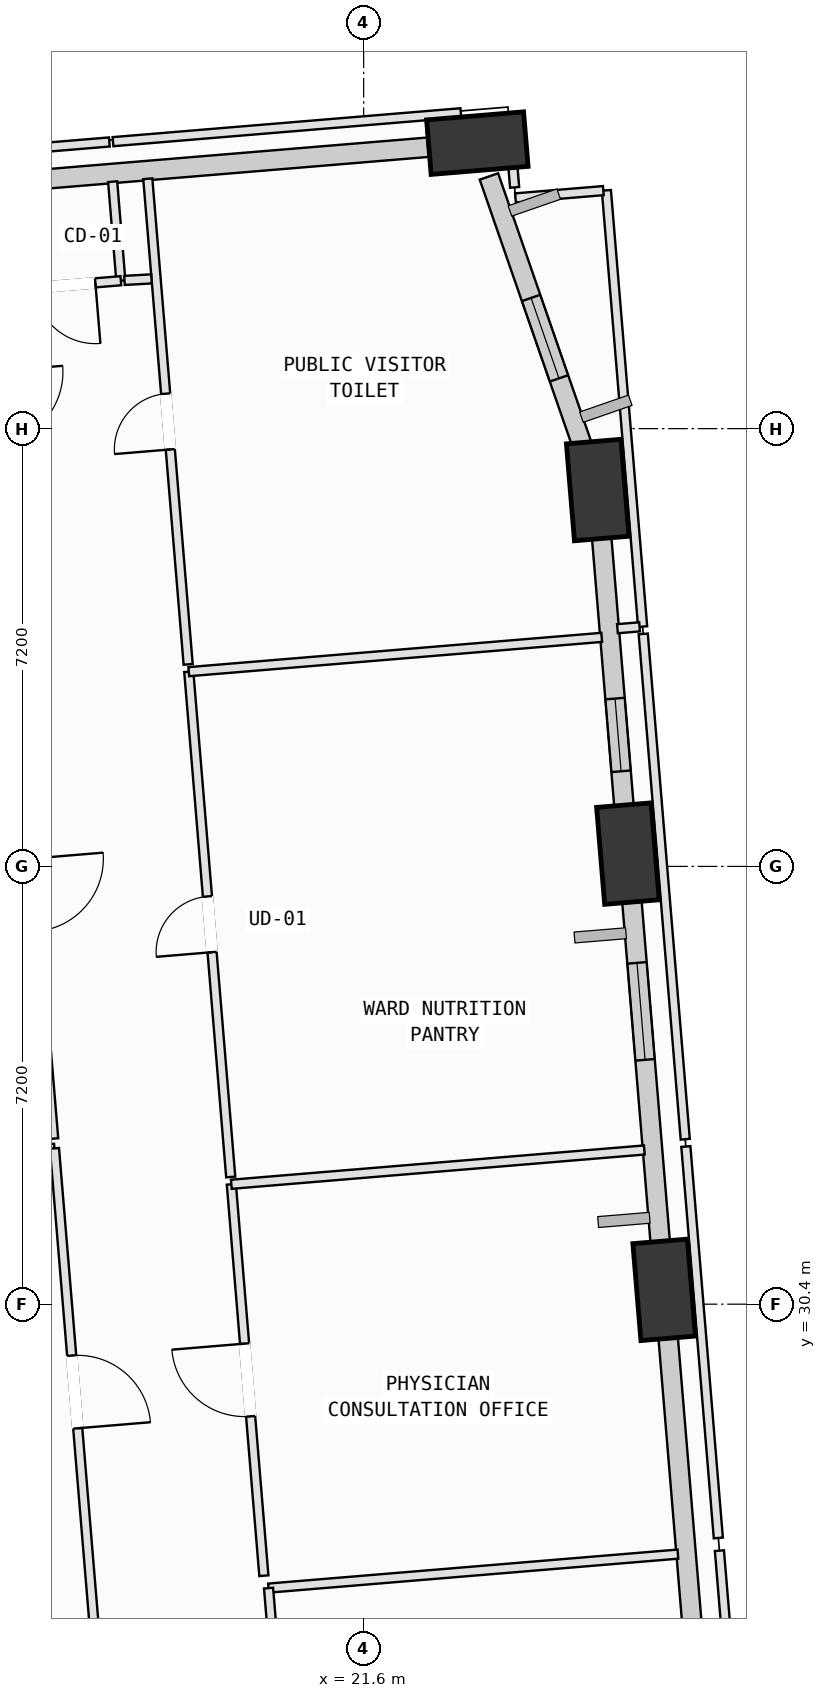
"""IFC4 building model, lengths in metres.
Left out: names, types, materials, properties, quantities, classifications, styles, units other than length and angle.
Written with IfcOpenShell. Run it as: python <this file> out.ifc"""

import sys

from ifc_helpers import new_model, si_unit, direction, frame, frame_2d, origin, origin_2d, place, context, subcontext, project, spatial, rectangle, extrude, element, fill, save


model = new_model("IFC4")
c1 = context("Model", 3, precision=1e-05, world=origin(), true_north=direction((0.0, 1.0)))
c2 = subcontext(c1, "Body", "Model", "MODEL_VIEW")
j1 = project(units=[si_unit("LENGTHUNIT", "METRE"), si_unit("PLANEANGLEUNIT", "RADIAN")], contexts=[c1])
p1 = place(None, origin())
s1 = spatial("IfcSite", under=j1, at=p1, CompositionType="ELEMENT")
p2 = place(p1, origin())
s2 = spatial("IfcBuilding", under=s1, at=p2, CompositionType="ELEMENT")
p3 = place(p2, frame((0.0, 0.0, 43.0)))
s3 = spatial("IfcBuildingStorey", under=s2, at=p3, CompositionType="ELEMENT", Elevation=43.0)
p4 = place(p3, frame((26.542, 30.635, 0.002), z_axis=(-0.023929015916, -0.029422922632, 0.999280588134), x_axis=(0.564092616343, 0.824846092772, 0.03779475396)))
e1 = element("IfcColumn", 1, at=p4, inside=s3, PredefinedType="COLUMN", context=c2, shape_type="SweptSolid", body=[
    extrude(rectangle(XDim=1.6, YDim=0.9, at=origin_2d()), origin(), (0.0, 0.0, 1.0), 4.0),
])
p5 = place(p3, frame((25.946, 37.811, 0.002), z_axis=(-0.053590964429, -0.03206922331, 0.99804788134), x_axis=(0.810957592379, 0.581785272083, 0.062238899011)))
e2 = element("IfcColumn", 2, at=p5, inside=s3, PredefinedType="COLUMN", context=c2, shape_type="SweptSolid", body=[
    extrude(rectangle(XDim=1.6, YDim=0.9, at=origin_2d()), origin(), (0.0, 0.0, 1.0), 4.004),
])
p6 = place(p3, frame((25.449, 43.79, 0.002), z_axis=(-0.078149906761, -0.034327529138, 0.996350446789), x_axis=(0.875790181589, 0.47513759138, 0.085063664917)))
e3 = element("IfcColumn", 3, at=p6, inside=s3, PredefinedType="COLUMN", context=c2, shape_type="SweptSolid", body=[
    extrude(rectangle(XDim=1.6, YDim=0.9, at=origin_2d()), origin(), (0.0, 0.0, 1.0), 4.011),
])
p7 = place(p3, frame((23.47, 49.496, 0.002), z_axis=(-0.10139716979, -0.042562524565, 0.993935131415), x_axis=(0.461606570923, -0.887038020539, 0.009106250522)))
e4 = element("IfcColumn", 4, at=p7, inside=s3, PredefinedType="COLUMN", context=c2, shape_type="SweptSolid", body=[
    extrude(rectangle(XDim=1.6, YDim=0.9, at=origin_2d()), origin(), (0.0, 0.0, 1.0), 4.021),
])
p8 = place(p3, frame((27.138, 23.464, 0.0), z_axis=(0.0, 0.0, 1.0), x_axis=(-0.082810543058, 0.996565308426, 0.0)))
e5 = element("IfcWall", 5, at=p8, inside=s3, PredefinedType="SOLIDWALL", context=c2, shape_type="SweptSolid", body=[
    extrude(rectangle(XDim=6.536, YDim=0.32, at=frame_2d((3.268, 0.0))), origin(), (0.0, 0.0, 1.0), 3.165),
])
p9 = place(p3, frame((26.497, 31.185, 0.0), z_axis=(0.0, 0.0, 1.0), x_axis=(-0.082812984625, 0.996565105539, 0.0)))
e6 = element("IfcWall", 6, at=p9, inside=s3, PredefinedType="SOLIDWALL", context=c2, shape_type="SweptSolid", body=[
    extrude(rectangle(XDim=5.996, YDim=0.32, at=frame_2d((2.998, 0.0))), origin(), (0.0, 0.0, 1.0), 3.165),
])
p10 = place(p9, frame((3.246, 0.0, 0.75)))
e7 = element("IfcOpeningElement", 7, at=p10, cuts=e6, PredefinedType="OPENING", context=c2, shape_type="SweptSolid", body=[
    extrude(rectangle(XDim=1.6, YDim=1.95, at=frame_2d((0.8, 0.975))), frame((0.0, 0.17, 0.0), z_axis=(0.0, -1.0, 0.0), x_axis=(1.0, 0.0, 0.0)), (0.0, 0.0, 1.0), 0.34),
])
p11 = place(p3, frame((25.901, 38.351, 0.0), z_axis=(0.0, 0.0, 1.0), x_axis=(-0.082781175694, 0.996567748299, 0.0)))
e8 = element("IfcWall", 8, at=p11, inside=s3, PredefinedType="SOLIDWALL", context=c2, shape_type="SweptSolid", body=[
    extrude(rectangle(XDim=4.816, YDim=0.32, at=frame_2d((2.408, 0.0))), origin(), (0.0, 0.0, 1.0), 3.165),
])
p12 = place(p11, frame((0.816, 0.0, 0.75)))
e9 = element("IfcOpeningElement", 9, at=p12, cuts=e8, PredefinedType="OPENING", context=c2, shape_type="SweptSolid", body=[
    extrude(rectangle(XDim=1.2, YDim=1.75, at=frame_2d((0.6, 0.875))), frame((0.0, 0.17, 0.0), z_axis=(0.0, -1.0, 0.0), x_axis=(1.0, 0.0, 0.0)), (0.0, 0.0, 1.0), 0.34),
])
p13 = place(p3, frame((23.66, 48.948, 0.0), z_axis=(0.0, 0.0, 1.0), x_axis=(0.327739954764, -0.9447679726, 0.0)))
e10 = element("IfcWall", 10, at=p13, inside=s3, PredefinedType="SOLIDWALL", context=c2, shape_type="SweptSolid", body=[
    extrude(rectangle(XDim=4.889, YDim=0.32, at=frame_2d((2.444, 0.0))), origin(), (0.0, 0.0, 1.0), 3.165),
])
p14 = place(p13, frame((2.115, 0.0, 0.75)))
e11 = element("IfcOpeningElement", 11, at=p14, cuts=e10, PredefinedType="OPENING", context=c2, shape_type="SweptSolid", body=[
    extrude(rectangle(XDim=1.4, YDim=1.85, at=frame_2d((0.7, 0.925))), frame((0.0, 0.17, 0.0), z_axis=(0.0, -1.0, 0.0), x_axis=(1.0, 0.0, 0.0)), (0.0, 0.0, 1.0), 0.34),
])
p15 = place(p3, frame((15.679, 48.849, 0.0), z_axis=(0.0, 0.0, 1.0), x_axis=(0.996566404155, 0.082797355694, 0.0)))
e12 = element("IfcWall", 12, at=p15, inside=s3, PredefinedType="SOLIDWALL", context=c2, shape_type="SweptSolid", body=[
    extrude(rectangle(XDim=7.003, YDim=0.32, at=frame_2d((3.501, 0.0))), origin(), (0.0, 0.0, 1.0), 3.165),
])
p16 = place(p3, frame((5.588, 32.055, 0.0), z_axis=(0.0, 0.0, 1.0), x_axis=(0.996565539079, 0.082807767273, 0.0)))
e13 = element("IfcWall", 13, at=p16, inside=s3, PredefinedType="PARTITIONING", context=c2, shape_type="SweptSolid", body=[
    extrude(rectangle(XDim=10.965, YDim=0.15, at=frame_2d((5.482, 0.0))), origin(), (0.0, 0.0, 1.0), 3.365),
])
p17 = place(p3, frame((16.515, 32.963, 0.0), z_axis=(0.0, 0.0, 1.0), x_axis=(0.082841912697, -0.996562701239, 0.0)))
e14 = element("IfcWall", 14, at=p17, inside=s3, PredefinedType="PARTITIONING", context=c2, shape_type="SweptSolid", body=[
    extrude(rectangle(XDim=8.04, YDim=0.15, at=frame_2d((4.02, 0.0))), origin(), (0.0, 0.0, 1.0), 3.78),
])
p18 = place(p17, frame((3.42, 0.0, 0.0)))
e15 = element("IfcOpeningElement", 15, at=p18, cuts=e14, PredefinedType="OPENING", context=c2, shape_type="SweptSolid", body=[
    extrude(rectangle(XDim=1.2, YDim=2.15, at=frame_2d((0.6, 1.075))), frame((0.0, 0.085, 0.0), z_axis=(0.0, -1.0, 0.0), x_axis=(1.0, 0.0, 0.0)), (0.0, 0.0, 1.0), 0.17),
])
p19 = place(p3, frame((15.836, 41.135, 0.0), z_axis=(0.0, 0.0, 1.0), x_axis=(0.082841912697, -0.996562701239, 0.0)))
e16 = element("IfcWall", 16, at=p19, inside=s3, PredefinedType="PARTITIONING", context=c2, shape_type="SweptSolid", body=[
    extrude(rectangle(XDim=8.04, YDim=0.15, at=frame_2d((4.02, 0.0))), origin(), (0.0, 0.0, 1.0), 3.78),
])
p20 = place(p19, frame((3.42, 0.0, 0.0)))
e17 = element("IfcOpeningElement", 17, at=p20, cuts=e16, PredefinedType="OPENING", context=c2, shape_type="SweptSolid", body=[
    extrude(rectangle(XDim=1.2, YDim=2.15, at=frame_2d((0.6, 1.075))), frame((0.0, 0.085, 0.0), z_axis=(0.0, -1.0, 0.0), x_axis=(1.0, 0.0, 0.0)), (0.0, 0.0, 1.0), 0.17),
])
p21 = place(p3, frame((20.036, 25.73, 0.0), z_axis=(0.0, 0.0, 1.0), x_axis=(0.99656939588, 0.082761338769, 0.0)))
e18 = element("IfcWall", 18, at=p21, inside=s3, PredefinedType="PARTITIONING", context=c2, shape_type="SweptSolid", body=[
    extrude(rectangle(XDim=6.755, YDim=0.15, at=frame_2d((3.378, 0.0))), origin(), (0.0, 0.0, 1.0), 3.78),
])
p22 = place(p3, frame((27.451, 26.346, 0.0), z_axis=(0.0, 0.0, 1.0), x_axis=(0.082846950407, -0.996562282453, 0.0)))
e19 = element("IfcWall", 19, at=p22, inside=s3, PredefinedType="PARTITIONING", context=c2, shape_type="SweptSolid", body=[
    extrude(rectangle(XDim=2.85, YDim=0.15, at=frame_2d((1.425, 0.0))), origin(), (0.0, 0.0, 1.0), 3.78),
])
p23 = place(p3, frame((20.464, 20.58, 0.0), z_axis=(0.0, 0.0, 1.0), x_axis=(-0.08286562624, 0.996560729704, 0.0)))
e20 = element("IfcWall", 20, at=p23, inside=s3, PredefinedType="PARTITIONING", context=c2, shape_type="SweptSolid", body=[
    extrude(rectangle(XDim=5.168, YDim=0.15, at=frame_2d((2.584, 0.0))), origin(), (0.0, 0.0, 1.0), 3.78),
])
p24 = place(p3, frame((19.959, 25.934, 0.0), z_axis=(0.0, 0.0, 1.0), x_axis=(-0.082801525688, 0.996566057692, 0.0)))
e21 = element("IfcWall", 21, at=p24, inside=s3, PredefinedType="PARTITIONING", context=c2, shape_type="SweptSolid", body=[
    extrude(rectangle(XDim=6.46, YDim=0.15, at=frame_2d((3.23, 0.0))), origin(), (0.0, 0.0, 1.0), 3.78),
])
p25 = place(p24, frame((2.63, 0.0, 0.0)))
e22 = element("IfcOpeningElement", 22, at=p25, cuts=e21, PredefinedType="OPENING", context=c2, shape_type="SweptSolid", body=[
    extrude(rectangle(XDim=1.2, YDim=2.15, at=frame_2d((0.6, 1.075))), frame((0.0, 0.085, 0.0), z_axis=(0.0, -1.0, 0.0), x_axis=(1.0, 0.0, 0.0)), (0.0, 0.0, 1.0), 0.17),
])
p26 = place(p3, frame((19.424, 32.372, 0.0), z_axis=(0.0, 0.0, 1.0), x_axis=(0.996570419035, 0.08274901754, 0.0)))
e23 = element("IfcWall", 23, at=p26, inside=s3, PredefinedType="PARTITIONING", context=c2, shape_type="SweptSolid", body=[
    extrude(rectangle(XDim=6.815, YDim=0.15, at=frame_2d((3.408, 0.0))), origin(), (0.0, 0.0, 1.0), 3.365),
])
p27 = place(p3, frame((26.899, 32.993, 0.0), z_axis=(0.0, 0.0, 1.0), x_axis=(0.082688926435, -0.996575406803, 0.0)))
e24 = element("IfcWall", 24, at=p27, inside=s3, PredefinedType="PARTITIONING", context=c2, shape_type="SweptSolid", body=[
    extrude(rectangle(XDim=6.46, YDim=0.15, at=frame_2d((3.23, 0.0))), origin(), (0.0, 0.0, 1.0), 3.78),
])
p28 = place(p3, frame((19.414, 32.492, 0.0), z_axis=(0.0, 0.0, 1.0), x_axis=(-0.082730519486, 0.996571954826, 0.0)))
e25 = element("IfcWall", 25, at=p28, inside=s3, PredefinedType="PARTITIONING", context=c2, shape_type="SweptSolid", body=[
    extrude(rectangle(XDim=8.34, YDim=0.15, at=frame_2d((4.17, 0.0))), origin(), (0.0, 0.0, 1.0), 3.78),
])
p29 = place(p28, frame((3.71, 0.0, 0.0)))
e26 = element("IfcOpeningElement", 26, at=p29, cuts=e25, PredefinedType="OPENING", context=c2, shape_type="SweptSolid", body=[
    extrude(rectangle(XDim=0.92, YDim=2.1, at=frame_2d((0.46, 1.05))), frame((0.0, 0.085, 0.0), z_axis=(0.0, -1.0, 0.0), x_axis=(1.0, 0.0, 0.0)), (0.0, 0.0, 1.0), 0.17),
])
p30 = place(p3, frame((18.724, 40.803, 0.0), z_axis=(0.0, 0.0, 1.0), x_axis=(0.996569192266, 0.08276379055, 0.0)))
e27 = element("IfcWall", 27, at=p30, inside=s3, PredefinedType="PARTITIONING", context=c2, shape_type="SweptSolid", body=[
    extrude(rectangle(XDim=6.814, YDim=0.15, at=frame_2d((3.407, 0.0))), origin(), (0.0, 0.0, 1.0), 3.78),
])
p31 = place(p3, frame((26.198, 41.424, 0.0), z_axis=(0.0, 0.0, 1.0), x_axis=(0.082846815437, -0.996562293674, 0.0)))
e28 = element("IfcWall", 28, at=p31, inside=s3, PredefinedType="PARTITIONING", context=c2, shape_type="SweptSolid", body=[
    extrude(rectangle(XDim=8.34, YDim=0.15, at=frame_2d((4.17, 0.0))), origin(), (0.0, 0.0, 1.0), 3.78),
])
p32 = place(p3, frame((25.592, 48.719, 0.0), z_axis=(0.0, 0.0, 1.0), x_axis=(0.082773264745, -0.996568405401, 0.0)))
e29 = element("IfcWall", 29, at=p32, inside=s3, PredefinedType="PARTITIONING", context=c2, shape_type="SweptSolid", body=[
    extrude(rectangle(XDim=7.2, YDim=0.15, at=frame_2d((3.6, 0.0))), origin(), (0.0, 0.0, 1.0), 3.78),
])
p33 = place(p3, frame((26.138, 41.54, 0.0), z_axis=(0.0, 0.0, 1.0), x_axis=(-0.996614559718, -0.082215688025, 0.0)))
e30 = element("IfcWall", 30, at=p33, inside=s3, PredefinedType="PARTITIONING", context=c2, shape_type="SweptSolid", body=[
    extrude(rectangle(XDim=0.365, YDim=0.15, at=frame_2d((0.183, 0.0))), origin(), (0.0, 0.0, 1.0), 3.78),
])
p34 = place(p3, frame((18.714, 40.923, 0.0), z_axis=(0.0, 0.0, 1.0), x_axis=(-0.082858919776, 0.996561287334, 0.0)))
e31 = element("IfcWall", 31, at=p34, inside=s3, PredefinedType="PARTITIONING", context=c2, shape_type="SweptSolid", body=[
    extrude(rectangle(XDim=8.014, YDim=0.15, at=frame_2d((4.007, 0.0))), origin(), (0.0, 0.0, 1.0), 3.78),
])
p35 = place(p34, frame((3.547, 0.0, 0.0)))
e32 = element("IfcOpeningElement", 32, at=p35, cuts=e31, PredefinedType="OPENING", context=c2, shape_type="SweptSolid", body=[
    extrude(rectangle(XDim=0.92, YDim=2.1, at=frame_2d((0.46, 1.05))), frame((0.0, 0.085, 0.0), z_axis=(0.0, -1.0, 0.0), x_axis=(1.0, 0.0, 0.0)), (0.0, 0.0, 1.0), 0.17),
])
p36 = place(p3, frame((22.643, 49.618, 0.0), z_axis=(0.0, 0.0, 1.0), x_axis=(0.996563011348, 0.082838182092, 0.0)))
e33 = element("IfcWall", 33, at=p36, inside=s3, PredefinedType="PARTITIONING", context=c2, shape_type="SweptSolid", body=[
    extrude(rectangle(XDim=1.365, YDim=0.15, at=frame_2d((0.682, 0.0))), origin(), (0.0, 0.0, 1.0), 3.165),
])
p37 = place(p3, frame((24.007, 49.681, 0.0), z_axis=(0.0, 0.0, 1.0), x_axis=(0.082891074815, -0.996558613287, 0.0)))
e34 = element("IfcWall", 34, at=p37, inside=s3, PredefinedType="PARTITIONING", context=c2, shape_type="SweptSolid", body=[
    extrude(rectangle(XDim=0.916, YDim=0.15, at=frame_2d((0.458, 0.0))), origin(), (0.0, 0.0, 1.0), 3.78),
])
p38 = place(p3, frame((24.097, 48.595, 0.0), z_axis=(0.0, 0.0, 1.0), x_axis=(0.996563153583, 0.082836470952, 0.0)))
e35 = element("IfcWall", 35, at=p38, inside=s3, PredefinedType="PARTITIONING", context=c2, shape_type="SweptSolid", body=[
    extrude(rectangle(XDim=1.45, YDim=0.15, at=frame_2d((0.725, 0.0))), origin(), (0.0, 0.0, 1.0), 3.78),
])
p39 = place(p3, frame((11.698, 49.04, 0.0), z_axis=(0.0, 0.0, 1.0), x_axis=(0.996571817192, 0.082732177406, 0.0)))
e36 = element("IfcWall", 36, at=p39, inside=s3, PredefinedType="PARTITIONING", context=c2, shape_type="SweptSolid", body=[
    extrude(rectangle(XDim=5.74, YDim=0.15, at=frame_2d((2.87, 0.0))), origin(), (0.0, 0.0, 1.0), 3.78),
])
p40 = place(p3, frame((17.472, 48.862, 0.0), z_axis=(0.0, 0.0, 1.0), x_axis=(0.08258816432, -0.996583762217, 0.0)))
e37 = element("IfcWall", 37, at=p40, inside=s3, PredefinedType="PARTITIONING", context=c2, shape_type="SweptSolid", body=[
    extrude(rectangle(XDim=1.635, YDim=0.15, at=frame_2d((0.817, 0.0))), origin(), (0.0, 0.0, 1.0), 3.78),
])
p41 = place(p3, frame((17.607, 47.233, 0.0), z_axis=(0.0, 0.0, 1.0), x_axis=(-0.996564333674, -0.082822272657, 0.0)))
e38 = element("IfcWall", 38, at=p41, inside=s3, PredefinedType="PARTITIONING", context=c2, shape_type="SweptSolid", body=[
    extrude(rectangle(XDim=2.173, YDim=0.15, at=frame_2d((1.086, 0.0))), origin(), (0.0, 0.0, 1.0), 3.78),
])
p42 = place(p41, frame((0.421, 0.0, 0.0)))
e39 = element("IfcOpeningElement", 39, at=p42, cuts=e38, PredefinedType="OPENING", context=c2, shape_type="SweptSolid", body=[
    extrude(rectangle(XDim=1.0, YDim=2.12, at=frame_2d((0.5, 1.06))), frame((0.0, 0.085, 0.0), z_axis=(0.0, -1.0, 0.0), x_axis=(1.0, 0.0, 0.0)), (0.0, 0.0, 1.0), 0.17),
])
p43 = place(p3, frame((18.11, 47.263, 0.0), z_axis=(0.0, 0.0, 1.0), x_axis=(-0.998424603538, -0.05610981243, 0.0)))
e40 = element("IfcWall", 40, at=p43, inside=s3, PredefinedType="PARTITIONING", context=c2, shape_type="SweptSolid", body=[
    extrude(rectangle(XDim=0.444, YDim=0.15, at=frame_2d((0.222, 0.0))), origin(), (0.0, 0.0, 1.0), 3.78),
])
p44 = place(p3, frame((17.478, 49.52, 0.0), z_axis=(0.0, 0.0, 1.0), x_axis=(0.996568309292, 0.082774421865, 0.0)))
e41 = element("IfcWall", 41, at=p44, inside=s3, PredefinedType="PARTITIONING", context=c2, shape_type="SweptSolid", body=[
    extrude(rectangle(XDim=5.74, YDim=0.15, at=frame_2d((2.87, 0.0))), origin(), (0.0, 0.0, 1.0), 3.78),
])
p45 = place(p10, origin())
e42 = element("IfcWindow", 42, at=p45, inside=s3, PartitioningType="SINGLE_PANEL", PredefinedType="WINDOW", context=c2, shape_type="SweptSolid", body=[
    extrude(rectangle(XDim=1.6, YDim=1.95, at=frame_2d((0.8, 0.975))), frame((0.0, 0.03, 0.0), z_axis=(0.0, -1.0, 0.0), x_axis=(1.0, 0.0, 0.0)), (0.0, 0.0, 1.0), 0.06),
])
fill(e7, e42)
p46 = place(p12, origin())
e43 = element("IfcWindow", 43, at=p46, inside=s3, PartitioningType="SINGLE_PANEL", PredefinedType="WINDOW", context=c2, shape_type="SweptSolid", body=[
    extrude(rectangle(XDim=1.2, YDim=1.75, at=frame_2d((0.6, 0.875))), frame((0.0, 0.03, 0.0), z_axis=(0.0, -1.0, 0.0), x_axis=(1.0, 0.0, 0.0)), (0.0, 0.0, 1.0), 0.06),
])
fill(e9, e43)
p47 = place(p14, origin())
e44 = element("IfcWindow", 44, at=p47, inside=s3, PartitioningType="SINGLE_PANEL", PredefinedType="WINDOW", context=c2, shape_type="SweptSolid", body=[
    extrude(rectangle(XDim=1.4, YDim=1.85, at=frame_2d((0.7, 0.925))), frame((0.0, 0.03, 0.0), z_axis=(0.0, -1.0, 0.0), x_axis=(1.0, 0.0, 0.0)), (0.0, 0.0, 1.0), 0.06),
])
fill(e11, e44)
p48 = place(p18, origin())
e45 = element("IfcDoor", 45, at=p48, inside=s3, OperationType="SINGLE_SWING_RIGHT", PredefinedType="DOOR", context=c2, shape_type="SweptSolid", body=[
    extrude(rectangle(XDim=1.2, YDim=2.15, at=frame_2d((0.6, 1.075))), frame((0.0, 0.025, 0.0), z_axis=(0.0, -1.0, 0.0), x_axis=(1.0, 0.0, 0.0)), (0.0, 0.0, 1.0), 0.05),
])
fill(e15, e45)
p49 = place(p25, origin())
e46 = element("IfcDoor", 46, at=p49, inside=s3, OperationType="SINGLE_SWING_RIGHT", PredefinedType="DOOR", context=c2, shape_type="SweptSolid", body=[
    extrude(rectangle(XDim=1.2, YDim=2.15, at=frame_2d((0.6, 1.075))), frame((0.0, 0.025, 0.0), z_axis=(0.0, -1.0, 0.0), x_axis=(1.0, 0.0, 0.0)), (0.0, 0.0, 1.0), 0.05),
])
fill(e22, e46)
p50 = place(p29, origin())
e47 = element("IfcDoor", 47, at=p50, inside=s3, OperationType="SINGLE_SWING_LEFT", PredefinedType="DOOR", context=c2, shape_type="SweptSolid", body=[
    extrude(rectangle(XDim=0.92, YDim=2.1, at=frame_2d((0.46, 1.05))), frame((0.0, 0.025, 0.0), z_axis=(0.0, -1.0, 0.0), x_axis=(1.0, 0.0, 0.0)), (0.0, 0.0, 1.0), 0.05),
])
fill(e26, e47)
p51 = place(p35, origin())
e48 = element("IfcDoor", 48, at=p51, inside=s3, OperationType="SINGLE_SWING_LEFT", PredefinedType="DOOR", context=c2, shape_type="SweptSolid", body=[
    extrude(rectangle(XDim=0.92, YDim=2.1, at=frame_2d((0.46, 1.05))), frame((0.0, 0.025, 0.0), z_axis=(0.0, -1.0, 0.0), x_axis=(1.0, 0.0, 0.0)), (0.0, 0.0, 1.0), 0.05),
])
fill(e32, e48)
p52 = place(p42, origin())
e49 = element("IfcDoor", 49, at=p52, inside=s3, OperationType="SINGLE_SWING_LEFT", PredefinedType="DOOR", context=c2, shape_type="SweptSolid", body=[
    extrude(rectangle(XDim=1.0, YDim=2.12, at=frame_2d((0.5, 1.06))), frame((0.0, 0.025, 0.0), z_axis=(0.0, -1.0, 0.0), x_axis=(1.0, 0.0, 0.0)), (0.0, 0.0, 1.0), 0.05),
])
fill(e39, e49)
save(model, sys.argv[1])
